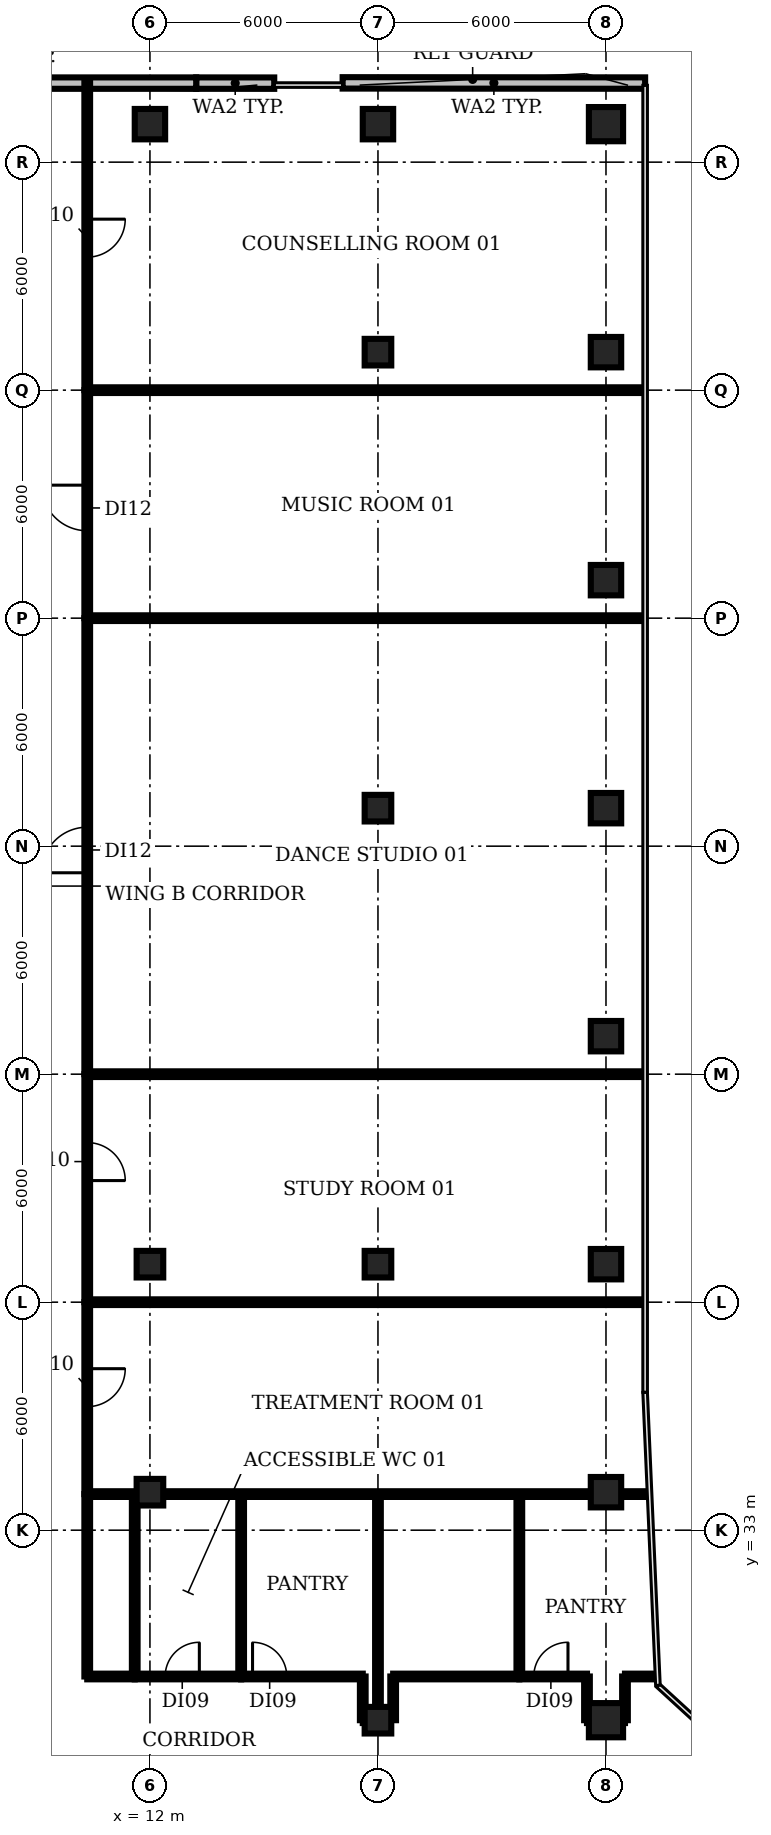
"""IFC4 building model, lengths in metres.
Left out: names, types, materials, properties, quantities, classifications, styles, units other than length and angle.
Written with IfcOpenShell. Run it as: python <this file> out.ifc"""

import sys

from ifc_helpers import new_model, si_unit, direction, frame, frame_2d, origin, origin_2d, place, context, subcontext, project, spatial, rectangle, circle, extrude, element, fill, save


model = new_model("IFC4")
c1 = context("Model", 3, precision=1e-05, world=origin(), true_north=direction((0.0, 1.0)))
c2 = subcontext(c1, "Body", "Model", "MODEL_VIEW")
j1 = project(units=[si_unit("LENGTHUNIT", "METRE"), si_unit("PLANEANGLEUNIT", "RADIAN")], contexts=[c1])
p1 = place(None, origin())
s1 = spatial("IfcSite", under=j1, at=p1, CompositionType="ELEMENT")
p2 = place(p1, origin())
s2 = spatial("IfcBuilding", under=s1, at=p2, CompositionType="ELEMENT")
p3 = place(p2, frame((0.0, 0.0, 218.0)))
s3 = spatial("IfcBuildingStorey", under=s2, at=p3, CompositionType="ELEMENT", Elevation=218.0)
for number, where, z_axis, x_axis in (
    (1, (12.0, 34.0, 0.0), (0.0, 0.0, 1.0), (1.0, 0.0, 0.0)),
    (2, (12.0, 40.0, 0.0), (0.0, 0.0, 1.0), (1.0, 0.0, 0.0)),
):
    element("IfcColumn", number, at=place(p3, frame(where, z_axis=z_axis, x_axis=x_axis)), inside=s3, PredefinedType="COLUMN", context=c2, shape_type="SweptSolid", body=[
        extrude(rectangle(XDim=0.7, YDim=0.7, at=origin_2d()), origin(), (0.0, 0.0, 1.0), 3.85),
    ])
p4 = place(p3, frame((12.0, 70.0, 0.0), z_axis=(0.0, 0.0, 1.0), x_axis=(1.0, 0.0, 0.0)))
e3 = element("IfcColumn", 3, at=p4, inside=s3, PredefinedType="COLUMN", context=c2, shape_type="SweptSolid", body=[
    extrude(rectangle(XDim=0.8, YDim=0.8, at=origin_2d()), origin(), (0.0, 0.0, 1.0), 3.85),
])
for number, where, z_axis, x_axis in (
    (4, (18.0, 28.0, 0.0), (0.0, 0.0, 1.0), (1.0, 0.0, 0.0)),
    (5, (18.0, 40.0, 0.0), (0.0, 0.0, 1.0), (1.0, 0.0, 0.0)),
    (6, (18.0, 52.0, 0.0), (0.0, 0.0, 1.0), (1.0, 0.0, 0.0)),
    (7, (18.0, 64.0, 0.0), (0.0, 0.0, 1.0), (1.0, 0.0, 0.0)),
):
    element("IfcColumn", number, at=place(p3, frame(where, z_axis=z_axis, x_axis=x_axis)), inside=s3, PredefinedType="COLUMN", context=c2, shape_type="SweptSolid", body=[
        extrude(rectangle(XDim=0.7, YDim=0.7, at=origin_2d()), origin(), (0.0, 0.0, 1.0), 3.85),
    ])
p5 = place(p3, frame((18.0, 70.0, 0.0), z_axis=(0.0, 0.0, 1.0), x_axis=(1.0, 0.0, 0.0)))
e8 = element("IfcColumn", 8, at=p5, inside=s3, PredefinedType="COLUMN", context=c2, shape_type="SweptSolid", body=[
    extrude(rectangle(XDim=0.8, YDim=0.8, at=origin_2d()), origin(), (0.0, 0.0, 1.0), 3.85),
])
p6 = place(p3, frame((24.0, 28.0, 0.0), z_axis=(0.0, 0.0, 1.0), x_axis=(1.0, 0.0, 0.0)))
e9 = element("IfcColumn", 9, at=p6, inside=s3, PredefinedType="COLUMN", context=c2, shape_type="SweptSolid", body=[
    extrude(circle(Radius=0.45, at=origin_2d()), origin(), (0.0, 0.0, 1.0), 3.85),
])
for number, where, z_axis, x_axis in (
    (10, (24.0, 34.0, 0.0), (0.0, 0.0, 1.0), (1.0, 0.0, 0.0)),
    (11, (24.0, 40.0, 0.0), (0.0, 0.0, 1.0), (1.0, 0.0, 0.0)),
    (12, (24.0, 46.0, 0.0), (0.0, 0.0, 1.0), (1.0, 0.0, 0.0)),
    (13, (24.0, 52.0, 0.0), (0.0, 0.0, 1.0), (1.0, 0.0, 0.0)),
    (14, (24.0, 58.0, 0.0), (0.0, 0.0, 1.0), (1.0, 0.0, 0.0)),
    (15, (24.0, 64.0, 0.0), (0.0, 0.0, 1.0), (1.0, 0.0, 0.0)),
):
    element("IfcColumn", number, at=place(p3, frame(where, z_axis=z_axis, x_axis=x_axis)), inside=s3, PredefinedType="COLUMN", context=c2, shape_type="SweptSolid", body=[
        extrude(rectangle(XDim=0.8, YDim=0.8, at=origin_2d()), origin(), (0.0, 0.0, 1.0), 3.85),
    ])
p7 = place(p3, frame((24.0, 70.0, 0.0), z_axis=(0.0, 0.0, 1.0), x_axis=(1.0, 0.0, 0.0)))
e16 = element("IfcColumn", 16, at=p7, inside=s3, PredefinedType="COLUMN", context=c2, shape_type="SweptSolid", body=[
    extrude(circle(Radius=0.45, at=origin_2d()), origin(), (0.0, 0.0, 1.0), 3.85),
])
p8 = place(p3, frame((25.03, 71.081, 0.0), z_axis=(0.0, 0.0, 1.0), x_axis=(-0.99999979256, 0.000644112371, 0.0)))
e17 = element("IfcWall", 17, at=p8, inside=s3, PredefinedType="SOLIDWALL", context=c2, shape_type="SweptSolid", body=[
    extrude(rectangle(XDim=7.96, YDim=0.3, at=frame_2d((3.98, 0.0))), origin(), (0.0, 0.0, 1.0), 3.85),
])
p9 = place(p3, frame((15.271, 71.079, 0.0), z_axis=(0.0, 0.0, 1.0), x_axis=(-0.999999823309, 0.000594459531, 0.0)))
e18 = element("IfcWall", 18, at=p9, inside=s3, PredefinedType="SOLIDWALL", context=c2, shape_type="SweptSolid", body=[
    extrude(rectangle(XDim=2.053, YDim=0.3, at=frame_2d((1.027, 0.0))), origin(), (0.0, 0.0, 1.0), 3.85),
])
p10 = place(p3, frame((13.217, 71.08, 0.0), z_axis=(0.0, 0.0, 1.0), x_axis=(-1.0, 0.0, 0.0)))
e19 = element("IfcWall", 19, at=p10, inside=s3, PredefinedType="SOLIDWALL", context=c2, shape_type="SweptSolid", body=[
    extrude(rectangle(XDim=9.785, YDim=0.3, at=frame_2d((4.893, 0.0))), origin(), (0.0, 0.0, 1.0), 3.85),
])
p11 = place(p3, frame((10.35, 29.15, 0.0), z_axis=(0.0, 0.0, 1.0), x_axis=(0.0, 1.0, 0.0)))
e20 = element("IfcWall", 20, at=p11, inside=s3, PredefinedType="PARTITIONING", context=c2, shape_type="SweptSolid", body=[
    extrude(rectangle(XDim=4.8, YDim=0.15, at=frame_2d((2.4, 0.0))), origin(), (0.0, 0.0, 1.0), 2.88),
])
p12 = place(p3, frame((10.35, 29.15, 0.0), z_axis=(0.0, 0.0, 1.0), x_axis=(1.0, 0.0, 0.0)))
e21 = element("IfcWall", 21, at=p12, inside=s3, PredefinedType="PARTITIONING", context=c2, shape_type="SweptSolid", body=[
    extrude(rectangle(XDim=1.25, YDim=0.15, at=frame_2d((0.625, 0.0))), origin(), (0.0, 0.0, 1.0), 2.88),
])
p13 = place(p3, frame((10.35, 33.95, 0.0), z_axis=(0.0, 0.0, 1.0), x_axis=(1.0, 0.0, 0.0)))
e22 = element("IfcWall", 22, at=p13, inside=s3, PredefinedType="PARTITIONING", context=c2, shape_type="SweptSolid", body=[
    extrude(rectangle(XDim=1.242, YDim=0.15, at=frame_2d((0.621, 0.0))), origin(), (0.0, 0.0, 1.0), 2.88),
])
p14 = place(p3, frame((10.35, 39.0, 0.0), z_axis=(0.0, 0.0, 1.0), x_axis=(0.0, -1.0, 0.0)))
e23 = element("IfcWall", 23, at=p14, inside=s3, PredefinedType="PARTITIONING", context=c2, shape_type="SweptSolid", body=[
    extrude(rectangle(XDim=5.05, YDim=0.15, at=frame_2d((2.525, 0.0))), origin(), (0.0, 0.0, 1.0), 2.88),
])
p15 = place(p14, frame((1.75, 0.0, 0.0)))
e24 = element("IfcOpeningElement", 24, at=p15, cuts=e23, PredefinedType="OPENING", context=c2, shape_type="SweptSolid", body=[
    extrude(rectangle(XDim=1.0, YDim=2.1, at=frame_2d((0.5, 1.05))), frame((0.0, 0.085, 0.0), z_axis=(0.0, -1.0, 0.0), x_axis=(1.0, 0.0, 0.0)), (0.0, 0.0, 1.0), 0.17),
])
p16 = place(p3, frame((10.35, 39.0, 0.0), z_axis=(0.0, 0.0, 1.0), x_axis=(1.0, 0.0, 0.0)))
e25 = element("IfcWall", 25, at=p16, inside=s3, PredefinedType="PARTITIONING", context=c2, shape_type="SweptSolid", body=[
    extrude(rectangle(XDim=14.63, YDim=0.15, at=frame_2d((7.315, 0.0))), origin(), (0.0, 0.0, 1.0), 2.88),
])
p17 = place(p3, frame((10.35, 45.0, 0.0), z_axis=(0.0, 0.0, 1.0), x_axis=(0.0, -1.0, 0.0)))
e26 = element("IfcWall", 26, at=p17, inside=s3, PredefinedType="PARTITIONING", context=c2, shape_type="SweptSolid", body=[
    extrude(rectangle(XDim=6.0, YDim=0.15, at=frame_2d((3.0, 0.0))), origin(), (0.0, 0.0, 1.0), 2.88),
])
p18 = place(p17, frame((1.8, 0.0, 0.0)))
e27 = element("IfcOpeningElement", 27, at=p18, cuts=e26, PredefinedType="OPENING", context=c2, shape_type="SweptSolid", body=[
    extrude(rectangle(XDim=1.0, YDim=2.1, at=frame_2d((0.5, 1.05))), frame((0.0, 0.085, 0.0), z_axis=(0.0, -1.0, 0.0), x_axis=(1.0, 0.0, 0.0)), (0.0, 0.0, 1.0), 0.17),
])
p19 = place(p3, frame((10.35, 45.0, 0.0), z_axis=(0.0, 0.0, 1.0), x_axis=(0.0, 1.0, 0.0)))
e28 = element("IfcWall", 28, at=p19, inside=s3, PredefinedType="PARTITIONING", context=c2, shape_type="SweptSolid", body=[
    extrude(rectangle(XDim=12.0, YDim=0.15, at=frame_2d((6.0, 0.0))), origin(), (0.0, 0.0, 1.0), 2.88),
])
p20 = place(p19, frame((5.3, 0.0, 0.0)))
e29 = element("IfcOpeningElement", 29, at=p20, cuts=e28, PredefinedType="OPENING", context=c2, shape_type="SweptSolid", body=[
    extrude(rectangle(XDim=1.2, YDim=2.1, at=frame_2d((0.6, 1.05))), frame((0.0, 0.085, 0.0), z_axis=(0.0, -1.0, 0.0), x_axis=(1.0, 0.0, 0.0)), (0.0, 0.0, 1.0), 0.17),
])
p21 = place(p3, frame((10.35, 45.0, 0.0), z_axis=(0.0, 0.0, 1.0), x_axis=(1.0, 0.0, 0.0)))
e30 = element("IfcWall", 30, at=p21, inside=s3, PredefinedType="PARTITIONING", context=c2, shape_type="SweptSolid", body=[
    extrude(rectangle(XDim=14.63, YDim=0.15, at=frame_2d((7.315, 0.0))), origin(), (0.0, 0.0, 1.0), 2.88),
])
p22 = place(p3, frame((10.35, 57.0, 0.0), z_axis=(0.0, 0.0, 1.0), x_axis=(0.0, 1.0, 0.0)))
e31 = element("IfcWall", 31, at=p22, inside=s3, PredefinedType="PARTITIONING", context=c2, shape_type="SweptSolid", body=[
    extrude(rectangle(XDim=6.0, YDim=0.15, at=frame_2d((3.0, 0.0))), origin(), (0.0, 0.0, 1.0), 2.88),
])
p23 = place(p22, frame((2.3, 0.0, 0.0)))
e32 = element("IfcOpeningElement", 32, at=p23, cuts=e31, PredefinedType="OPENING", context=c2, shape_type="SweptSolid", body=[
    extrude(rectangle(XDim=1.2, YDim=2.1, at=frame_2d((0.6, 1.05))), frame((0.0, 0.085, 0.0), z_axis=(0.0, -1.0, 0.0), x_axis=(1.0, 0.0, 0.0)), (0.0, 0.0, 1.0), 0.17),
])
for number, where, z_axis, x_axis in (
    (33, (10.35, 57.0, 0.0), (0.0, 0.0, 1.0), (1.0, 0.0, 0.0)),
    (34, (10.35, 63.0, 0.0), (0.0, 0.0, 1.0), (1.0, 0.0, 0.0)),
):
    element("IfcWall", number, at=place(p3, frame(where, z_axis=z_axis, x_axis=x_axis)), inside=s3, PredefinedType="PARTITIONING", context=c2, shape_type="SweptSolid", body=[
        extrude(rectangle(XDim=14.63, YDim=0.15, at=frame_2d((7.315, 0.0))), origin(), (0.0, 0.0, 1.0), 2.88),
    ])
p24 = place(p3, frame((10.35, 71.09, 0.0), z_axis=(0.0, 0.0, 1.0), x_axis=(0.0, -1.0, 0.0)))
e35 = element("IfcWall", 35, at=p24, inside=s3, PredefinedType="PARTITIONING", context=c2, shape_type="SweptSolid", body=[
    extrude(rectangle(XDim=8.09, YDim=0.15, at=frame_2d((4.045, 0.0))), origin(), (0.0, 0.0, 1.0), 2.88),
])
p25 = place(p24, frame((3.59, 0.0, 0.0)))
e36 = element("IfcOpeningElement", 36, at=p25, cuts=e35, PredefinedType="OPENING", context=c2, shape_type="SweptSolid", body=[
    extrude(rectangle(XDim=1.0, YDim=2.1, at=frame_2d((0.5, 1.05))), frame((0.0, 0.085, 0.0), z_axis=(0.0, -1.0, 0.0), x_axis=(1.0, 0.0, 0.0)), (0.0, 0.0, 1.0), 0.17),
])
p26 = place(p3, frame((11.6, 29.15, 0.0), z_axis=(0.0, 0.0, 1.0), x_axis=(0.0, 1.0, 0.0)))
e37 = element("IfcWall", 37, at=p26, inside=s3, PredefinedType="PARTITIONING", context=c2, shape_type="SweptSolid", body=[
    extrude(rectangle(XDim=4.72, YDim=0.15, at=frame_2d((2.36, 0.0))), origin(), (0.0, 0.0, 1.0), 2.88),
])
p27 = place(p3, frame((11.6, 29.15, 0.0), z_axis=(0.0, 0.0, 1.0), x_axis=(1.0, 0.0, 0.0)))
e38 = element("IfcWall", 38, at=p27, inside=s3, PredefinedType="PARTITIONING", context=c2, shape_type="SweptSolid", body=[
    extrude(rectangle(XDim=2.8, YDim=0.15, at=frame_2d((1.4, 0.0))), origin(), (0.0, 0.0, 1.0), 2.88),
])
p28 = place(p27, frame((0.8, 0.0, 0.0)))
e39 = element("IfcOpeningElement", 39, at=p28, cuts=e38, PredefinedType="OPENING", context=c2, shape_type="SweptSolid", body=[
    extrude(rectangle(XDim=0.9, YDim=2.1, at=frame_2d((0.45, 1.05))), frame((0.0, 0.085, 0.0), z_axis=(0.0, -1.0, 0.0), x_axis=(1.0, 0.0, 0.0)), (0.0, 0.0, 1.0), 0.17),
])
p29 = place(p3, frame((11.696, 33.95, 0.0), z_axis=(0.0, 0.0, 1.0), x_axis=(1.0, 0.0, 0.0)))
e40 = element("IfcWall", 40, at=p29, inside=s3, PredefinedType="PARTITIONING", context=c2, shape_type="SweptSolid", body=[
    extrude(rectangle(XDim=0.621, YDim=0.15, at=frame_2d((0.311, 0.0))), origin(), (0.0, 0.0, 1.0), 2.88),
])
p30 = place(p3, frame((12.42, 33.95, 0.0), z_axis=(0.0, 0.0, 1.0), x_axis=(1.0, 0.0, 0.0)))
e41 = element("IfcWall", 41, at=p30, inside=s3, PredefinedType="PARTITIONING", context=c2, shape_type="SweptSolid", body=[
    extrude(rectangle(XDim=12.68, YDim=0.15, at=frame_2d((6.34, 0.0))), origin(), (0.0, 0.0, 1.0), 2.88),
])
p31 = place(p3, frame((14.4, 29.15, 0.0), z_axis=(0.0, 0.0, 1.0), x_axis=(0.0, 1.0, 0.0)))
e42 = element("IfcWall", 42, at=p31, inside=s3, PredefinedType="PARTITIONING", context=c2, shape_type="SweptSolid", body=[
    extrude(rectangle(XDim=4.8, YDim=0.15, at=frame_2d((2.4, 0.0))), origin(), (0.0, 0.0, 1.0), 2.88),
])
p32 = place(p3, frame((14.4, 29.15, 0.0), z_axis=(0.0, 0.0, 1.0), x_axis=(1.0, 0.0, 0.0)))
e43 = element("IfcWall", 43, at=p32, inside=s3, PredefinedType="PARTITIONING", context=c2, shape_type="SweptSolid", body=[
    extrude(rectangle(XDim=3.2, YDim=0.15, at=frame_2d((1.6, 0.0))), origin(), (0.0, 0.0, 1.0), 2.88),
])
p33 = place(p32, frame((0.3, 0.0, 0.0)))
e44 = element("IfcOpeningElement", 44, at=p33, cuts=e43, PredefinedType="OPENING", context=c2, shape_type="SweptSolid", body=[
    extrude(rectangle(XDim=0.9, YDim=2.1, at=frame_2d((0.45, 1.05))), frame((0.0, 0.085, 0.0), z_axis=(0.0, -1.0, 0.0), x_axis=(1.0, 0.0, 0.0)), (0.0, 0.0, 1.0), 0.17),
])
p34 = place(p3, frame((17.6, 28.0, 0.0), z_axis=(0.0, 0.0, 1.0), x_axis=(0.0, 1.0, 0.0)))
e45 = element("IfcWall", 45, at=p34, inside=s3, PredefinedType="PARTITIONING", context=c2, shape_type="SweptSolid", body=[
    extrude(rectangle(XDim=1.15, YDim=0.15, at=frame_2d((0.575, 0.0))), origin(), (0.0, 0.0, 1.0), 2.88),
])
p35 = place(p3, frame((17.6, 28.0, 0.0), z_axis=(0.0, 0.0, 1.0), x_axis=(1.0, 0.0, 0.0)))
e46 = element("IfcWall", 46, at=p35, inside=s3, PredefinedType="PARTITIONING", context=c2, shape_type="SweptSolid", body=[
    extrude(rectangle(XDim=0.4, YDim=0.15, at=frame_2d((0.2, 0.0))), origin(), (0.0, 0.0, 1.0), 2.88),
])
p36 = place(p3, frame((18.0, 28.0, 0.0), z_axis=(0.0, 0.0, 1.0), x_axis=(0.0, 1.0, 0.0)))
e47 = element("IfcWall", 47, at=p36, inside=s3, PredefinedType="PARTITIONING", context=c2, shape_type="SweptSolid", body=[
    extrude(rectangle(XDim=5.95, YDim=0.15, at=frame_2d((2.975, 0.0))), origin(), (0.0, 0.0, 1.0), 2.88),
])
p37 = place(p3, frame((18.4, 28.0, 0.0), z_axis=(0.0, 0.0, 1.0), x_axis=(0.0, 1.0, 0.0)))
e48 = element("IfcWall", 48, at=p37, inside=s3, PredefinedType="PARTITIONING", context=c2, shape_type="SweptSolid", body=[
    extrude(rectangle(XDim=1.15, YDim=0.15, at=frame_2d((0.575, 0.0))), origin(), (0.0, 0.0, 1.0), 2.88),
])
p38 = place(p3, frame((18.4, 29.15, 0.0), z_axis=(0.0, 0.0, 1.0), x_axis=(1.0, 0.0, 0.0)))
e49 = element("IfcWall", 49, at=p38, inside=s3, PredefinedType="PARTITIONING", context=c2, shape_type="SweptSolid", body=[
    extrude(rectangle(XDim=3.32, YDim=0.15, at=frame_2d((1.66, 0.0))), origin(), (0.0, 0.0, 1.0), 2.88),
])
p39 = place(p3, frame((21.72, 29.15, 0.0), z_axis=(0.0, 0.0, 1.0), x_axis=(0.0, 1.0, 0.0)))
e50 = element("IfcWall", 50, at=p39, inside=s3, PredefinedType="PARTITIONING", context=c2, shape_type="SweptSolid", body=[
    extrude(rectangle(XDim=4.8, YDim=0.15, at=frame_2d((2.4, 0.0))), origin(), (0.0, 0.0, 1.0), 2.88),
])
p40 = place(p3, frame((21.72, 29.15, 0.0), z_axis=(0.0, 0.0, 1.0), x_axis=(1.0, 0.0, 0.0)))
e51 = element("IfcWall", 51, at=p40, inside=s3, PredefinedType="PARTITIONING", context=c2, shape_type="SweptSolid", body=[
    extrude(rectangle(XDim=1.78, YDim=0.15, at=frame_2d((0.89, 0.0))), origin(), (0.0, 0.0, 1.0), 2.88),
])
p41 = place(p40, frame((0.38, 0.0, 0.0)))
e52 = element("IfcOpeningElement", 52, at=p41, cuts=e51, PredefinedType="OPENING", context=c2, shape_type="SweptSolid", body=[
    extrude(rectangle(XDim=0.9, YDim=2.1, at=frame_2d((0.45, 1.05))), frame((0.0, 0.085, 0.0), z_axis=(0.0, -1.0, 0.0), x_axis=(1.0, 0.0, 0.0)), (0.0, 0.0, 1.0), 0.17),
])
p42 = place(p3, frame((23.5, 28.0, 0.0), z_axis=(0.0, 0.0, 1.0), x_axis=(0.0, 1.0, 0.0)))
e53 = element("IfcWall", 53, at=p42, inside=s3, PredefinedType="PARTITIONING", context=c2, shape_type="SweptSolid", body=[
    extrude(rectangle(XDim=1.15, YDim=0.15, at=frame_2d((0.575, 0.0))), origin(), (0.0, 0.0, 1.0), 2.88),
])
p43 = place(p3, frame((23.5, 28.0, 0.0), z_axis=(0.0, 0.0, 1.0), x_axis=(1.0, 0.0, 0.0)))
e54 = element("IfcWall", 54, at=p43, inside=s3, PredefinedType="PARTITIONING", context=c2, shape_type="SweptSolid", body=[
    extrude(rectangle(XDim=1.0, YDim=0.15, at=frame_2d((0.5, 0.0))), origin(), (0.0, 0.0, 1.0), 2.88),
])
p44 = place(p3, frame((24.5, 28.0, 0.0), z_axis=(0.0, 0.0, 1.0), x_axis=(0.0, 1.0, 0.0)))
e55 = element("IfcWall", 55, at=p44, inside=s3, PredefinedType="PARTITIONING", context=c2, shape_type="SweptSolid", body=[
    extrude(rectangle(XDim=1.15, YDim=0.15, at=frame_2d((0.575, 0.0))), origin(), (0.0, 0.0, 1.0), 2.88),
])
p45 = place(p3, frame((24.5, 29.15, 0.0), z_axis=(0.0, 0.0, 1.0), x_axis=(1.0, 0.0, 0.0)))
e56 = element("IfcWall", 56, at=p45, inside=s3, PredefinedType="PARTITIONING", context=c2, shape_type="SweptSolid", body=[
    extrude(rectangle(XDim=0.796, YDim=0.15, at=frame_2d((0.398, 0.0))), origin(), (0.0, 0.0, 1.0), 2.88),
])
p46 = place(p15, origin())
e57 = element("IfcDoor", 57, at=p46, inside=s3, OperationType="SINGLE_SWING_LEFT", PredefinedType="DOOR", context=c2, shape_type="SweptSolid", body=[
    extrude(rectangle(XDim=1.0, YDim=2.1, at=frame_2d((0.5, 1.05))), frame((0.0, 0.025, 0.0), z_axis=(0.0, -1.0, 0.0), x_axis=(1.0, 0.0, 0.0)), (0.0, 0.0, 1.0), 0.05),
])
fill(e24, e57)
p47 = place(p18, origin())
e58 = element("IfcDoor", 58, at=p47, inside=s3, OperationType="SINGLE_SWING_RIGHT", PredefinedType="DOOR", context=c2, shape_type="SweptSolid", body=[
    extrude(rectangle(XDim=1.0, YDim=2.1, at=frame_2d((0.5, 1.05))), frame((0.0, 0.025, 0.0), z_axis=(0.0, -1.0, 0.0), x_axis=(1.0, 0.0, 0.0)), (0.0, 0.0, 1.0), 0.05),
])
fill(e27, e58)
p48 = place(p20, origin())
e59 = element("IfcDoor", 59, at=p48, inside=s3, OperationType="SINGLE_SWING_LEFT", PredefinedType="DOOR", context=c2, shape_type="SweptSolid", body=[
    extrude(rectangle(XDim=1.2, YDim=2.1, at=frame_2d((0.6, 1.05))), frame((0.0, 0.025, 0.0), z_axis=(0.0, -1.0, 0.0), x_axis=(1.0, 0.0, 0.0)), (0.0, 0.0, 1.0), 0.05),
])
fill(e29, e59)
p49 = place(p23, origin())
e60 = element("IfcDoor", 60, at=p49, inside=s3, OperationType="SINGLE_SWING_RIGHT", PredefinedType="DOOR", context=c2, shape_type="SweptSolid", body=[
    extrude(rectangle(XDim=1.2, YDim=2.1, at=frame_2d((0.6, 1.05))), frame((0.0, 0.025, 0.0), z_axis=(0.0, -1.0, 0.0), x_axis=(1.0, 0.0, 0.0)), (0.0, 0.0, 1.0), 0.05),
])
fill(e32, e60)
p50 = place(p25, origin())
e61 = element("IfcDoor", 61, at=p50, inside=s3, OperationType="SINGLE_SWING_LEFT", PredefinedType="DOOR", context=c2, shape_type="SweptSolid", body=[
    extrude(rectangle(XDim=1.0, YDim=2.1, at=frame_2d((0.5, 1.05))), frame((0.0, 0.025, 0.0), z_axis=(0.0, -1.0, 0.0), x_axis=(1.0, 0.0, 0.0)), (0.0, 0.0, 1.0), 0.05),
])
fill(e36, e61)
p51 = place(p28, origin())
e62 = element("IfcDoor", 62, at=p51, inside=s3, OperationType="SINGLE_SWING_RIGHT", PredefinedType="DOOR", context=c2, shape_type="SweptSolid", body=[
    extrude(rectangle(XDim=0.9, YDim=2.1, at=frame_2d((0.45, 1.05))), frame((0.0, 0.025, 0.0), z_axis=(0.0, -1.0, 0.0), x_axis=(1.0, 0.0, 0.0)), (0.0, 0.0, 1.0), 0.05),
])
fill(e39, e62)
p52 = place(p33, origin())
e63 = element("IfcDoor", 63, at=p52, inside=s3, OperationType="SINGLE_SWING_LEFT", PredefinedType="DOOR", context=c2, shape_type="SweptSolid", body=[
    extrude(rectangle(XDim=0.9, YDim=2.1, at=frame_2d((0.45, 1.05))), frame((0.0, 0.025, 0.0), z_axis=(0.0, -1.0, 0.0), x_axis=(1.0, 0.0, 0.0)), (0.0, 0.0, 1.0), 0.05),
])
fill(e44, e63)
p53 = place(p41, origin())
e64 = element("IfcDoor", 64, at=p53, inside=s3, OperationType="SINGLE_SWING_RIGHT", PredefinedType="DOOR", context=c2, shape_type="SweptSolid", body=[
    extrude(rectangle(XDim=0.9, YDim=2.1, at=frame_2d((0.45, 1.05))), frame((0.0, 0.025, 0.0), z_axis=(0.0, -1.0, 0.0), x_axis=(1.0, 0.0, 0.0)), (0.0, 0.0, 1.0), 0.05),
])
fill(e52, e64)
save(model, sys.argv[1])
